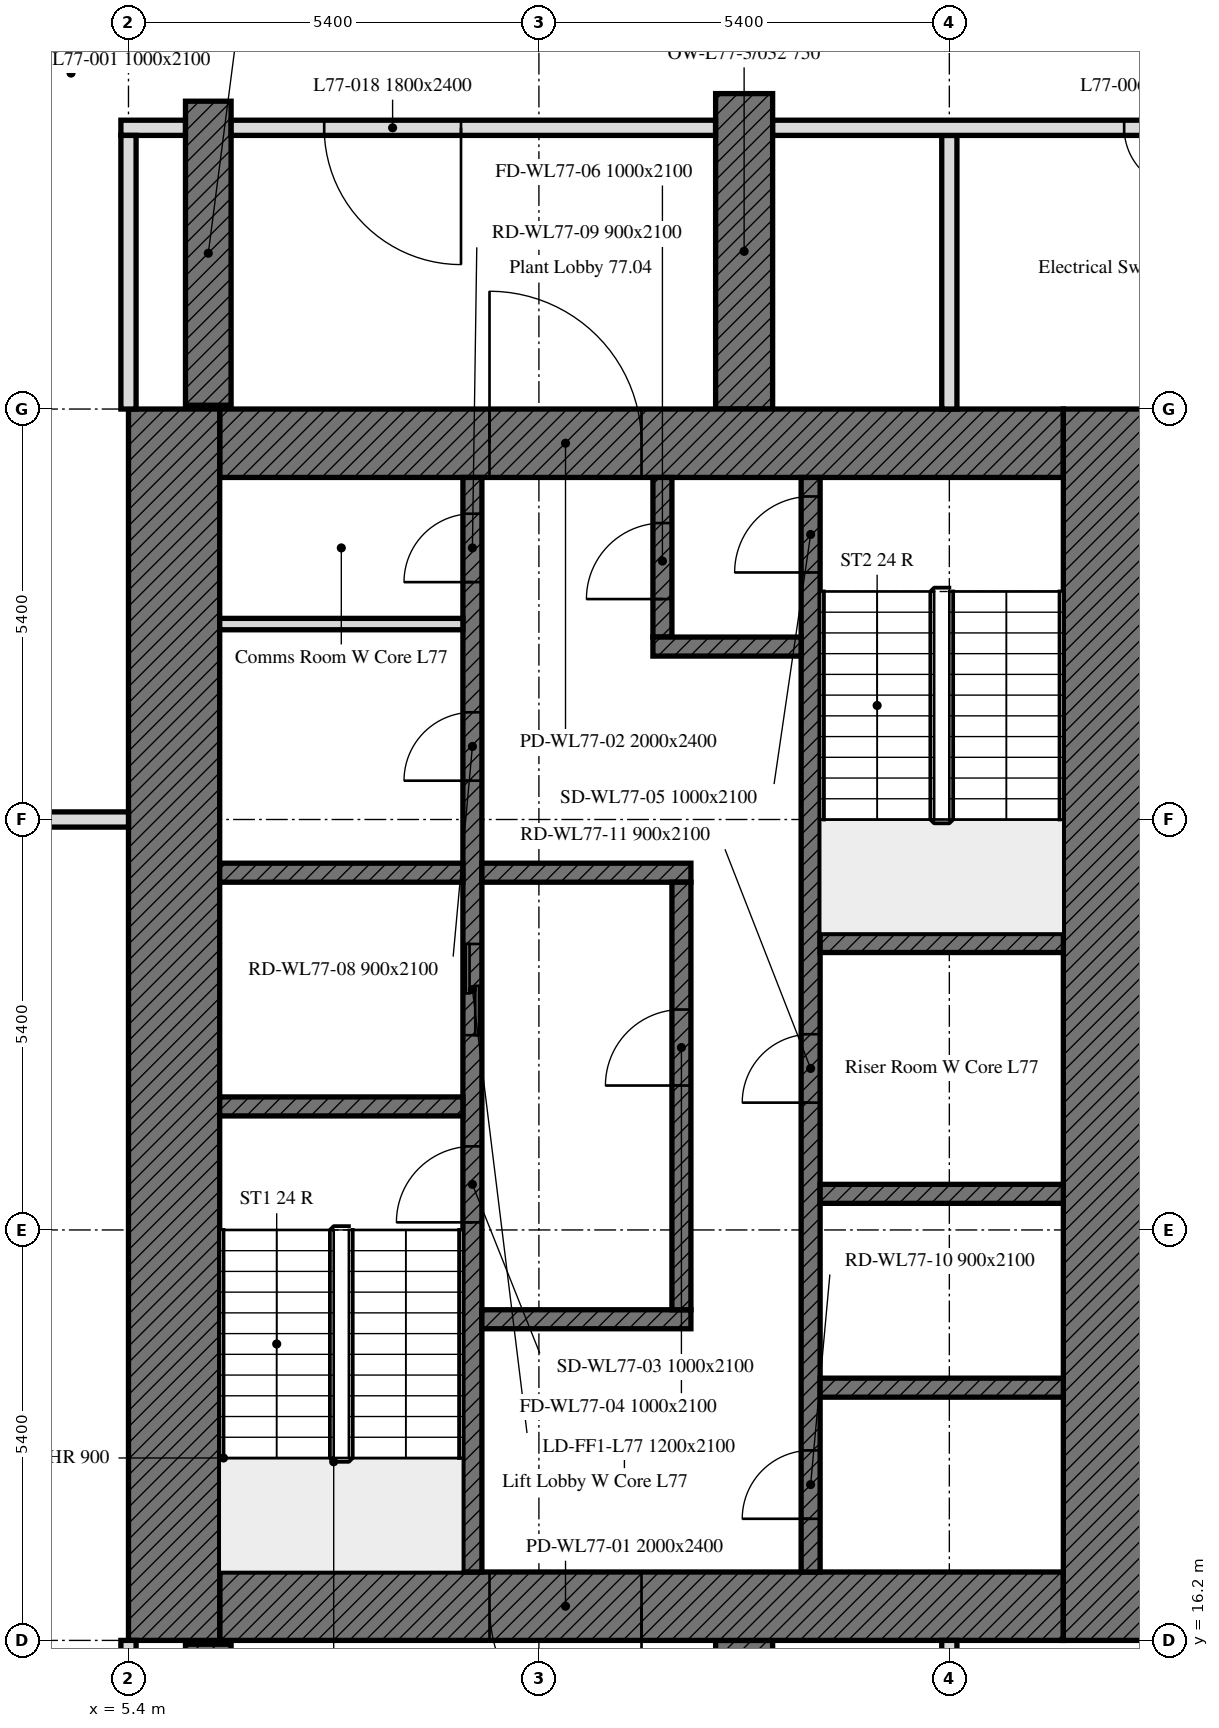
"""IFC4 building model, lengths in metres.
Left out: names, types, materials, properties, quantities, classifications, styles, units other than length and angle.
Written with IfcOpenShell. Run it as: python <this file> out.ifc"""

import sys

from ifc_helpers import new_model, si_unit, direction, frame, frame_2d, origin, place, context, subcontext, project, spatial, rectangle, extrude, element, fill, save


model = new_model("IFC4")
c1 = context("Model", 3, precision=1e-05, world=origin(), true_north=direction((0.0, 1.0)))
c2 = subcontext(c1, "Body", "Model", "MODEL_VIEW")
j1 = project(units=[si_unit("LENGTHUNIT", "METRE"), si_unit("PLANEANGLEUNIT", "RADIAN")], contexts=[c1])
p1 = place(None, origin())
s1 = spatial("IfcSite", under=j1, at=p1, CompositionType="ELEMENT")
p2 = place(p1, origin())
s2 = spatial("IfcBuilding", under=s1, at=p2, CompositionType="ELEMENT")
p3 = place(p2, frame((0.0, 0.0, 308.2)))
s3 = spatial("IfcBuildingStorey", under=s2, at=p3, CompositionType="ELEMENT", Elevation=308.2)
for number, where, z_axis, x_axis in (
    (1, (6.45, 12.15, 0.0), (0.0, 0.0, 1.0), (0.0, 1.0, 0.0)),
    (2, (6.45, 32.45, 0.0), (0.0, 0.0, 1.0), (0.0, 1.0, 0.0)),
):
    element("IfcWall", number, at=place(p3, frame(where, z_axis=z_axis, x_axis=x_axis)), inside=s3, PredefinedType="SHEAR", context=c2, shape_type="SweptSolid", body=[
        extrude(rectangle(XDim=4.0, YDim=0.6, at=frame_2d((2.0, 0.0))), origin(), (0.0, 0.0, 1.0), 4.2),
    ])
p4 = place(p3, frame((13.5, 12.05, 0.0), z_axis=(0.0, 0.0, 1.0), x_axis=(0.0, 1.0, 0.0)))
e3 = element("IfcWall", 3, at=p4, inside=s3, PredefinedType="SHEAR", context=c2, shape_type="SweptSolid", body=[
    extrude(rectangle(XDim=4.15, YDim=0.75, at=frame_2d((2.075, 0.0))), origin(), (0.0, 0.0, 1.0), 4.2),
])
p5 = place(p3, frame((13.5, 32.4, 0.0), z_axis=(0.0, 0.0, 1.0), x_axis=(0.0, 1.0, 0.0)))
e4 = element("IfcWall", 4, at=p5, inside=s3, PredefinedType="SHEAR", context=c2, shape_type="SweptSolid", body=[
    extrude(rectangle(XDim=4.15, YDim=0.75, at=frame_2d((2.075, 0.0))), origin(), (0.0, 0.0, 1.0), 4.2),
])
p6 = place(p3, frame((17.7, 16.65, 0.0), z_axis=(0.0, 0.0, 1.0), x_axis=(-1.0, 0.0, 0.0)))
e5 = element("IfcWall", 5, at=p6, inside=s3, PredefinedType="SOLIDWALL", context=c2, shape_type="SweptSolid", body=[
    extrude(rectangle(XDim=11.1, YDim=0.9, at=frame_2d((5.55, 0.0))), origin(), (0.0, 0.0, 1.0), 4.2),
])
p7 = place(p6, frame((5.55, 0.0, 0.0)))
e6 = element("IfcOpeningElement", 6, at=p7, cuts=e5, PredefinedType="OPENING", context=c2, shape_type="SweptSolid", body=[
    extrude(rectangle(XDim=2.0, YDim=2.4, at=frame_2d((1.0, 1.2))), frame((0.0, 0.45, 0.0), z_axis=(0.0, -1.0, 0.0), x_axis=(1.0, 0.0, 0.0)), (0.0, 0.0, 1.0), 0.9),
])
p8 = place(p3, frame((6.6, 31.95, 0.0), z_axis=(0.0, 0.0, 1.0), x_axis=(1.0, 0.0, 0.0)))
e7 = element("IfcWall", 7, at=p8, inside=s3, PredefinedType="SOLIDWALL", context=c2, shape_type="SweptSolid", body=[
    extrude(rectangle(XDim=11.1, YDim=0.9, at=frame_2d((5.55, 0.0))), origin(), (0.0, 0.0, 1.0), 4.2),
])
p9 = place(p8, frame((3.55, 0.0, 0.0)))
e8 = element("IfcOpeningElement", 8, at=p9, cuts=e7, PredefinedType="OPENING", context=c2, shape_type="SweptSolid", body=[
    extrude(rectangle(XDim=2.0, YDim=2.4, at=frame_2d((1.0, 1.2))), frame((0.0, 0.45, 0.0), z_axis=(0.0, -1.0, 0.0), x_axis=(1.0, 0.0, 0.0)), (0.0, 0.0, 1.0), 0.9),
])
for number, where, z_axis, x_axis in (
    (9, (6.0, 16.2, 0.0), (0.0, 0.0, 1.0), (0.0, 1.0, 0.0)),
    (10, (18.3, 32.4, 0.0), (0.0, 0.0, 1.0), (0.0, -1.0, 0.0)),
):
    element("IfcWall", number, at=place(p3, frame(where, z_axis=z_axis, x_axis=x_axis)), inside=s3, PredefinedType="SOLIDWALL", context=c2, shape_type="SweptSolid", body=[
        extrude(rectangle(XDim=16.2, YDim=1.2, at=frame_2d((8.1, 0.0))), origin(), (0.0, 0.0, 1.0), 4.2),
    ])
p10 = place(p3, frame((9.925, 17.1, 0.0), z_axis=(0.0, 0.0, 1.0), x_axis=(0.0, 1.0, 0.0)))
e11 = element("IfcWall", 11, at=p10, inside=s3, PredefinedType="SOLIDWALL", context=c2, shape_type="SweptSolid", body=[
    extrude(rectangle(XDim=14.4, YDim=0.25, at=frame_2d((7.2, 0.0))), origin(), (0.0, 0.0, 1.0), 4.2),
])
p11 = place(p10, frame((4.6, 0.0, 0.0)))
e12 = element("IfcOpeningElement", 12, at=p11, cuts=e11, PredefinedType="OPENING", context=c2, shape_type="SweptSolid", body=[
    extrude(rectangle(XDim=1.0, YDim=2.1, at=frame_2d((0.5, 1.05))), frame((0.0, 0.125, 0.0), z_axis=(0.0, -1.0, 0.0), x_axis=(1.0, 0.0, 0.0)), (0.0, 0.0, 1.0), 0.25),
])
p12 = place(p10, frame((7.062, 0.0, 0.0)))
e13 = element("IfcOpeningElement", 13, at=p12, cuts=e11, PredefinedType="OPENING", context=c2, shape_type="SweptSolid", body=[
    extrude(rectangle(XDim=1.2, YDim=2.1, at=frame_2d((0.6, 1.05))), frame((0.0, 0.125, 0.0), z_axis=(0.0, -1.0, 0.0), x_axis=(1.0, 0.0, 0.0)), (0.0, 0.0, 1.0), 0.25),
])
p13 = place(p10, frame((10.41, 0.0, 0.0)))
e14 = element("IfcOpeningElement", 14, at=p13, cuts=e11, PredefinedType="OPENING", context=c2, shape_type="SweptSolid", body=[
    extrude(rectangle(XDim=0.9, YDim=2.1, at=frame_2d((0.45, 1.05))), frame((0.0, 0.125, 0.0), z_axis=(0.0, -1.0, 0.0), x_axis=(1.0, 0.0, 0.0)), (0.0, 0.0, 1.0), 0.25),
])
p14 = place(p10, frame((13.023, 0.0, 0.0)))
e15 = element("IfcOpeningElement", 15, at=p14, cuts=e11, PredefinedType="OPENING", context=c2, shape_type="SweptSolid", body=[
    extrude(rectangle(XDim=0.9, YDim=2.1, at=frame_2d((0.45, 1.05))), frame((0.0, 0.125, 0.0), z_axis=(0.0, -1.0, 0.0), x_axis=(1.0, 0.0, 0.0)), (0.0, 0.0, 1.0), 0.25),
])
p15 = place(p3, frame((14.375, 17.1, 0.0), z_axis=(0.0, 0.0, 1.0), x_axis=(0.0, 1.0, 0.0)))
e16 = element("IfcWall", 16, at=p15, inside=s3, PredefinedType="SOLIDWALL", context=c2, shape_type="SweptSolid", body=[
    extrude(rectangle(XDim=14.4, YDim=0.25, at=frame_2d((7.2, 0.0))), origin(), (0.0, 0.0, 1.0), 4.2),
])
p16 = place(p15, frame((13.15, 0.0, 0.0)))
e17 = element("IfcOpeningElement", 17, at=p16, cuts=e16, PredefinedType="OPENING", context=c2, shape_type="SweptSolid", body=[
    extrude(rectangle(XDim=1.0, YDim=2.1, at=frame_2d((0.5, 1.05))), frame((0.0, 0.125, 0.0), z_axis=(0.0, -1.0, 0.0), x_axis=(1.0, 0.0, 0.0)), (0.0, 0.0, 1.0), 0.25),
])
p17 = place(p15, frame((0.7, 0.0, 0.0)))
e18 = element("IfcOpeningElement", 18, at=p17, cuts=e16, PredefinedType="OPENING", context=c2, shape_type="SweptSolid", body=[
    extrude(rectangle(XDim=0.9, YDim=2.1, at=frame_2d((0.45, 1.05))), frame((0.0, 0.125, 0.0), z_axis=(0.0, -1.0, 0.0), x_axis=(1.0, 0.0, 0.0)), (0.0, 0.0, 1.0), 0.25),
])
p18 = place(p15, frame((6.175, 0.0, 0.0)))
e19 = element("IfcOpeningElement", 19, at=p18, cuts=e16, PredefinedType="OPENING", context=c2, shape_type="SweptSolid", body=[
    extrude(rectangle(XDim=0.9, YDim=2.1, at=frame_2d((0.45, 1.05))), frame((0.0, 0.125, 0.0), z_axis=(0.0, -1.0, 0.0), x_axis=(1.0, 0.0, 0.0)), (0.0, 0.0, 1.0), 0.25),
])
for number, where, z_axis, x_axis in (
    (20, (6.6, 23.225, 0.0), (0.0, 0.0, 1.0), (1.0, 0.0, 0.0)),
    (21, (14.5, 25.375, 0.0), (0.0, 0.0, 1.0), (1.0, 0.0, 0.0)),
    (22, (14.5, 22.075, 0.0), (0.0, 0.0, 1.0), (1.0, 0.0, 0.0)),
    (23, (6.6, 26.3, 0.0), (0.0, 0.0, 1.0), (1.0, 0.0, 0.0)),
):
    element("IfcWall", number, at=place(p3, frame(where, z_axis=z_axis, x_axis=x_axis)), inside=s3, PredefinedType="SOLIDWALL", context=c2, shape_type="SweptSolid", body=[
        extrude(rectangle(XDim=3.2, YDim=0.25, at=frame_2d((1.6, 0.0))), origin(), (0.0, 0.0, 1.0), 4.2),
    ])
for number, where, z_axis, x_axis in (
    (24, (10.05, 26.3, 0.0), (0.0, 0.0, 1.0), (1.0, 0.0, 0.0)),
    (25, (10.05, 20.425, 0.0), (0.0, 0.0, 1.0), (1.0, 0.0, 0.0)),
):
    element("IfcWall", number, at=place(p3, frame(where, z_axis=z_axis, x_axis=x_axis)), inside=s3, PredefinedType="SOLIDWALL", context=c2, shape_type="SweptSolid", body=[
        extrude(rectangle(XDim=2.75, YDim=0.25, at=frame_2d((1.375, 0.0))), origin(), (0.0, 0.0, 1.0), 4.2),
    ])
p19 = place(p3, frame((12.425, 29.4, 0.0), z_axis=(0.0, 0.0, 1.0), x_axis=(0.0, 1.0, 0.0)))
e26 = element("IfcWall", 26, at=p19, inside=s3, PredefinedType="SOLIDWALL", context=c2, shape_type="SweptSolid", body=[
    extrude(rectangle(XDim=2.1, YDim=0.25, at=frame_2d((1.05, 0.0))), origin(), (0.0, 0.0, 1.0), 4.2),
])
p20 = place(p19, frame((0.5, 0.0, 0.0)))
e27 = element("IfcOpeningElement", 27, at=p20, cuts=e26, PredefinedType="OPENING", context=c2, shape_type="SweptSolid", body=[
    extrude(rectangle(XDim=1.0, YDim=2.1, at=frame_2d((0.5, 1.05))), frame((0.0, 0.125, 0.0), z_axis=(0.0, -1.0, 0.0), x_axis=(1.0, 0.0, 0.0)), (0.0, 0.0, 1.0), 0.25),
])
p21 = place(p3, frame((12.3, 29.275, 0.0), z_axis=(0.0, 0.0, 1.0), x_axis=(1.0, 0.0, 0.0)))
e28 = element("IfcWall", 28, at=p21, inside=s3, PredefinedType="SOLIDWALL", context=c2, shape_type="SweptSolid", body=[
    extrude(rectangle(XDim=1.95, YDim=0.25, at=frame_2d((0.975, 0.0))), origin(), (0.0, 0.0, 1.0), 4.2),
])
p22 = place(p3, frame((12.675, 20.55, 0.0), z_axis=(0.0, 0.0, 1.0), x_axis=(0.0, 1.0, 0.0)))
e29 = element("IfcWall", 29, at=p22, inside=s3, PredefinedType="SOLIDWALL", context=c2, shape_type="SweptSolid", body=[
    extrude(rectangle(XDim=5.625, YDim=0.25, at=frame_2d((2.812, 0.0))), origin(), (0.0, 0.0, 1.0), 4.2),
])
p23 = place(p22, frame((2.95, 0.0, 0.0)))
e30 = element("IfcOpeningElement", 30, at=p23, cuts=e29, PredefinedType="OPENING", context=c2, shape_type="SweptSolid", body=[
    extrude(rectangle(XDim=1.0, YDim=2.1, at=frame_2d((0.5, 1.05))), frame((0.0, 0.125, 0.0), z_axis=(0.0, -1.0, 0.0), x_axis=(1.0, 0.0, 0.0)), (0.0, 0.0, 1.0), 0.25),
])
p24 = place(p3, frame((14.5, 19.525, 0.0), z_axis=(0.0, 0.0, 1.0), x_axis=(1.0, 0.0, 0.0)))
e31 = element("IfcWall", 31, at=p24, inside=s3, PredefinedType="SOLIDWALL", context=c2, shape_type="SweptSolid", body=[
    extrude(rectangle(XDim=3.2, YDim=0.25, at=frame_2d((1.6, 0.0))), origin(), (0.0, 0.0, 1.0), 4.2),
])
p25 = place(p3, frame((6.6, 29.571, 0.0), z_axis=(0.0, 0.0, 1.0), x_axis=(1.0, 0.0, 0.0)))
e32 = element("IfcWall", 32, at=p25, inside=s3, PredefinedType="PARTITIONING", context=c2, shape_type="SweptSolid", body=[
    extrude(rectangle(XDim=3.2, YDim=0.15, at=frame_2d((1.6, 0.0))), origin(), (0.0, 0.0, 1.0), 4.2),
])
p26 = place(p3, frame((16.2, 36.0, 0.0), z_axis=(0.0, 0.0, 1.0), x_axis=(0.0, -1.0, 0.0)))
e33 = element("IfcWall", 33, at=p26, inside=s3, PredefinedType="PARTITIONING", context=c2, shape_type="SweptSolid", body=[
    extrude(rectangle(XDim=3.6, YDim=0.2, at=frame_2d((1.8, 0.0))), origin(), (0.0, 0.0, 1.0), 3.45),
])
p27 = place(p3, frame((33.824, 36.1, 0.0), z_axis=(0.0, 0.0, 1.0), x_axis=(-1.0, 0.0, 0.0)))
e34 = element("IfcWall", 34, at=p27, inside=s3, PredefinedType="PARTITIONING", context=c2, shape_type="SweptSolid", body=[
    extrude(rectangle(XDim=19.948, YDim=0.2, at=frame_2d((9.974, 0.0))), origin(), (0.0, 0.0, 1.0), 3.45),
])
p28 = place(p27, frame((3.641, 0.0, 0.0)))
e35 = element("IfcOpeningElement", 35, at=p28, cuts=e34, PredefinedType="OPENING", context=c2, shape_type="SweptSolid", body=[
    extrude(rectangle(XDim=1.0, YDim=2.1, at=frame_2d((0.5, 1.05))), frame((0.0, 0.1, 0.0), z_axis=(0.0, -1.0, 0.0), x_axis=(1.0, 0.0, 0.0)), (0.0, 0.0, 1.0), 0.2),
])
p29 = place(p27, frame((14.524, 0.0, 0.0)))
e36 = element("IfcOpeningElement", 36, at=p29, cuts=e34, PredefinedType="OPENING", context=c2, shape_type="SweptSolid", body=[
    extrude(rectangle(XDim=0.8, YDim=2.1, at=frame_2d((0.4, 1.05))), frame((0.0, 0.1, 0.0), z_axis=(0.0, -1.0, 0.0), x_axis=(1.0, 0.0, 0.0)), (0.0, 0.0, 1.0), 0.2),
])
p30 = place(p3, frame((13.124, 36.1, 0.0), z_axis=(0.0, 0.0, 1.0), x_axis=(-1.0, 0.0, 0.0)))
e37 = element("IfcWall", 37, at=p30, inside=s3, PredefinedType="PARTITIONING", context=c2, shape_type="SweptSolid", body=[
    extrude(rectangle(XDim=6.373, YDim=0.2, at=frame_2d((3.187, 0.0))), origin(), (0.0, 0.0, 1.0), 3.45),
])
p31 = place(p30, frame((3.349, 0.0, 0.0)))
e38 = element("IfcOpeningElement", 38, at=p31, cuts=e37, PredefinedType="OPENING", context=c2, shape_type="SweptSolid", body=[
    extrude(rectangle(XDim=1.8, YDim=2.4, at=frame_2d((0.9, 1.2))), frame((0.0, 0.1, 0.0), z_axis=(0.0, -1.0, 0.0), x_axis=(1.0, 0.0, 0.0)), (0.0, 0.0, 1.0), 0.2),
])
p32 = place(p3, frame((6.149, 36.1, 0.0), z_axis=(0.0, 0.0, 1.0), x_axis=(-1.0, 0.0, 0.0)))
e39 = element("IfcWall", 39, at=p32, inside=s3, PredefinedType="PARTITIONING", context=c2, shape_type="SweptSolid", body=[
    extrude(rectangle(XDim=0.849, YDim=0.2, at=frame_2d((0.424, 0.0))), origin(), (0.0, 0.0, 1.0), 4.2),
])
p33 = place(p3, frame((5.4, 36.0, 0.0), z_axis=(0.0, 0.0, 1.0), x_axis=(0.0, -1.0, 0.0)))
e40 = element("IfcWall", 40, at=p33, inside=s3, PredefinedType="PARTITIONING", context=c2, shape_type="SweptSolid", body=[
    extrude(rectangle(XDim=3.6, YDim=0.2, at=frame_2d((1.8, 0.0))), origin(), (0.0, 0.0, 1.0), 4.2),
])
p34 = place(p3, frame((0.751, 27.0, 0.0), z_axis=(0.0, 0.0, 1.0), x_axis=(1.0, 0.0, 0.0)))
e41 = element("IfcWall", 41, at=p34, inside=s3, PredefinedType="PARTITIONING", context=c2, shape_type="SweptSolid", body=[
    extrude(rectangle(XDim=4.649, YDim=0.2, at=frame_2d((2.324, 0.0))), origin(), (0.0, 0.0, 1.0), 3.45),
])
p35 = place(p3, frame((16.2, 16.2, 0.0), z_axis=(0.0, 0.0, 1.0), x_axis=(0.0, -1.0, 0.0)))
e42 = element("IfcWall", 42, at=p35, inside=s3, PredefinedType="PARTITIONING", context=c2, shape_type="SweptSolid", body=[
    extrude(rectangle(XDim=3.65, YDim=0.2, at=frame_2d((1.825, 0.0))), origin(), (0.0, 0.0, 1.0), 4.2),
])
p36 = place(p3, frame((5.4, 16.2, 0.0), z_axis=(0.0, 0.0, 1.0), x_axis=(0.0, -1.0, 0.0)))
e43 = element("IfcWall", 43, at=p36, inside=s3, PredefinedType="PARTITIONING", context=c2, shape_type="SweptSolid", body=[
    extrude(rectangle(XDim=3.85, YDim=0.2, at=frame_2d((1.925, 0.0))), origin(), (0.0, 0.0, 1.0), 4.2),
])
p37 = place(p7, origin())
e44 = element("IfcDoor", 44, at=p37, inside=s3, OperationType="DOUBLE_DOOR_SINGLE_SWING", PredefinedType="DOOR", context=c2, shape_type="SweptSolid", body=[
    extrude(rectangle(XDim=2.0, YDim=2.4, at=frame_2d((1.0, 1.2))), frame((0.0, 0.025, 0.0), z_axis=(0.0, -1.0, 0.0), x_axis=(1.0, 0.0, 0.0)), (0.0, 0.0, 1.0), 0.05),
])
fill(e6, e44)
p38 = place(p9, origin())
e45 = element("IfcDoor", 45, at=p38, inside=s3, OperationType="DOUBLE_DOOR_SINGLE_SWING", PredefinedType="DOOR", context=c2, shape_type="SweptSolid", body=[
    extrude(rectangle(XDim=2.0, YDim=2.4, at=frame_2d((1.0, 1.2))), frame((0.0, 0.025, 0.0), z_axis=(0.0, -1.0, 0.0), x_axis=(1.0, 0.0, 0.0)), (0.0, 0.0, 1.0), 0.05),
])
fill(e8, e45)
p39 = place(p11, origin())
e46 = element("IfcDoor", 46, at=p39, inside=s3, OperationType="SINGLE_SWING_LEFT", PredefinedType="DOOR", context=c2, shape_type="SweptSolid", body=[
    extrude(rectangle(XDim=1.0, YDim=2.1, at=frame_2d((0.5, 1.05))), frame((0.0, 0.025, 0.0), z_axis=(0.0, -1.0, 0.0), x_axis=(1.0, 0.0, 0.0)), (0.0, 0.0, 1.0), 0.05),
])
fill(e12, e46)
p40 = place(p23, origin())
e47 = element("IfcDoor", 47, at=p40, inside=s3, OperationType="SINGLE_SWING_LEFT", PredefinedType="DOOR", context=c2, shape_type="SweptSolid", body=[
    extrude(rectangle(XDim=1.0, YDim=2.1, at=frame_2d((0.5, 1.05))), frame((0.0, 0.025, 0.0), z_axis=(0.0, -1.0, 0.0), x_axis=(1.0, 0.0, 0.0)), (0.0, 0.0, 1.0), 0.05),
])
fill(e30, e47)
p41 = place(p16, origin())
e48 = element("IfcDoor", 48, at=p41, inside=s3, OperationType="SINGLE_SWING_LEFT", PredefinedType="DOOR", context=c2, shape_type="SweptSolid", body=[
    extrude(rectangle(XDim=1.0, YDim=2.1, at=frame_2d((0.5, 1.05))), frame((0.0, 0.025, 0.0), z_axis=(0.0, -1.0, 0.0), x_axis=(1.0, 0.0, 0.0)), (0.0, 0.0, 1.0), 0.05),
])
fill(e17, e48)
p42 = place(p20, origin())
e49 = element("IfcDoor", 49, at=p42, inside=s3, OperationType="SINGLE_SWING_LEFT", PredefinedType="DOOR", context=c2, shape_type="SweptSolid", body=[
    extrude(rectangle(XDim=1.0, YDim=2.1, at=frame_2d((0.5, 1.05))), frame((0.0, 0.025, 0.0), z_axis=(0.0, -1.0, 0.0), x_axis=(1.0, 0.0, 0.0)), (0.0, 0.0, 1.0), 0.05),
])
fill(e27, e49)
p43 = place(p12, origin())
e50 = element("IfcDoor", 50, at=p43, inside=s3, OperationType="DOUBLE_DOOR_SLIDING", PredefinedType="DOOR", context=c2, shape_type="SweptSolid", body=[
    extrude(rectangle(XDim=1.2, YDim=2.1, at=frame_2d((0.6, 1.05))), frame((0.0, 0.025, 0.0), z_axis=(0.0, -1.0, 0.0), x_axis=(1.0, 0.0, 0.0)), (0.0, 0.0, 1.0), 0.05),
])
fill(e13, e50)
p44 = place(p13, origin())
e51 = element("IfcDoor", 51, at=p44, inside=s3, OperationType="SINGLE_SWING_LEFT", PredefinedType="DOOR", context=c2, shape_type="SweptSolid", body=[
    extrude(rectangle(XDim=0.9, YDim=2.1, at=frame_2d((0.45, 1.05))), frame((0.0, 0.025, 0.0), z_axis=(0.0, -1.0, 0.0), x_axis=(1.0, 0.0, 0.0)), (0.0, 0.0, 1.0), 0.05),
])
fill(e14, e51)
p45 = place(p14, origin())
e52 = element("IfcDoor", 52, at=p45, inside=s3, OperationType="SINGLE_SWING_LEFT", PredefinedType="DOOR", context=c2, shape_type="SweptSolid", body=[
    extrude(rectangle(XDim=0.9, YDim=2.1, at=frame_2d((0.45, 1.05))), frame((0.0, 0.025, 0.0), z_axis=(0.0, -1.0, 0.0), x_axis=(1.0, 0.0, 0.0)), (0.0, 0.0, 1.0), 0.05),
])
fill(e15, e52)
p46 = place(p17, origin())
e53 = element("IfcDoor", 53, at=p46, inside=s3, OperationType="SINGLE_SWING_LEFT", PredefinedType="DOOR", context=c2, shape_type="SweptSolid", body=[
    extrude(rectangle(XDim=0.9, YDim=2.1, at=frame_2d((0.45, 1.05))), frame((0.0, 0.025, 0.0), z_axis=(0.0, -1.0, 0.0), x_axis=(1.0, 0.0, 0.0)), (0.0, 0.0, 1.0), 0.05),
])
fill(e18, e53)
p47 = place(p18, origin())
e54 = element("IfcDoor", 54, at=p47, inside=s3, OperationType="SINGLE_SWING_LEFT", PredefinedType="DOOR", context=c2, shape_type="SweptSolid", body=[
    extrude(rectangle(XDim=0.9, YDim=2.1, at=frame_2d((0.45, 1.05))), frame((0.0, 0.025, 0.0), z_axis=(0.0, -1.0, 0.0), x_axis=(1.0, 0.0, 0.0)), (0.0, 0.0, 1.0), 0.05),
])
fill(e19, e54)
p48 = place(p29, origin())
e55 = element("IfcDoor", 55, at=p48, inside=s3, OperationType="SINGLE_SWING_RIGHT", PredefinedType="DOOR", context=c2, shape_type="SweptSolid", body=[
    extrude(rectangle(XDim=0.8, YDim=2.1, at=frame_2d((0.4, 1.05))), frame((0.0, 0.025, 0.0), z_axis=(0.0, -1.0, 0.0), x_axis=(1.0, 0.0, 0.0)), (0.0, 0.0, 1.0), 0.05),
])
fill(e36, e55)
p49 = place(p31, origin())
e56 = element("IfcDoor", 56, at=p49, inside=s3, OperationType="DOUBLE_DOOR_SINGLE_SWING", PredefinedType="DOOR", context=c2, shape_type="SweptSolid", body=[
    extrude(rectangle(XDim=1.8, YDim=2.4, at=frame_2d((0.9, 1.2))), frame((0.0, 0.025, 0.0), z_axis=(0.0, -1.0, 0.0), x_axis=(1.0, 0.0, 0.0)), (0.0, 0.0, 1.0), 0.05),
])
fill(e38, e56)
save(model, sys.argv[1])
